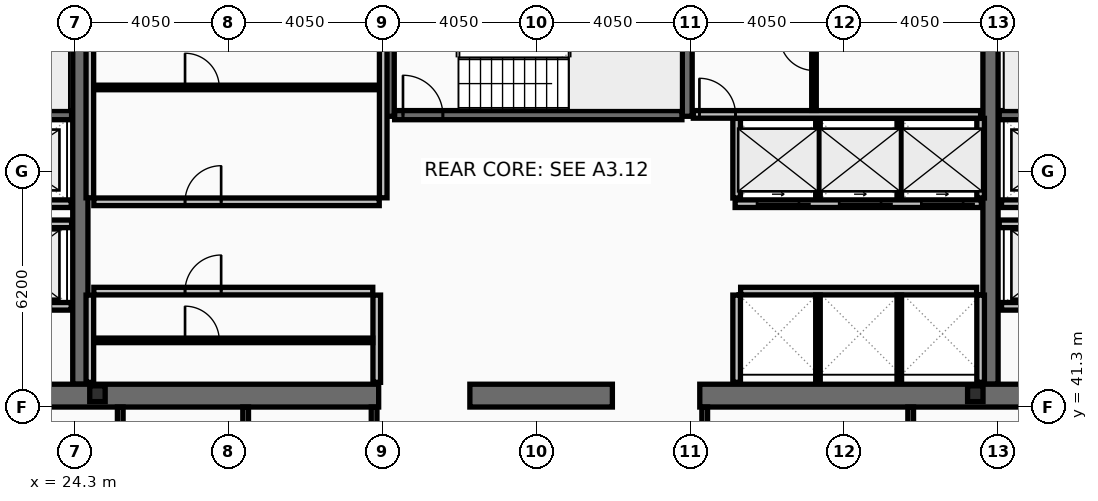
"""IFC4 building model, lengths in metres.
Left out: names, types, materials, properties, quantities, classifications, styles, units other than length and angle.
Written with IfcOpenShell. Run it as: python <this file> out.ifc"""

import sys

from ifc_helpers import new_model, si_unit, direction, frame, frame_2d, origin, origin_2d, place, context, subcontext, project, spatial, rectangle, i_section, extrude, element, fill, save


model = new_model("IFC4")
c1 = context("Model", 3, precision=1e-05, world=origin(), true_north=direction((0.0, 1.0)))
c2 = subcontext(c1, "Body", "Model", "MODEL_VIEW")
j1 = project(units=[si_unit("LENGTHUNIT", "METRE"), si_unit("PLANEANGLEUNIT", "RADIAN")], contexts=[c1])
p1 = place(None, origin())
s1 = spatial("IfcSite", under=j1, at=p1, CompositionType="ELEMENT")
p2 = place(p1, origin())
s2 = spatial("IfcBuilding", under=s1, at=p2, CompositionType="ELEMENT")
p3 = place(p2, frame((0.0, 0.0, 242.6)))
s3 = spatial("IfcBuildingStorey", under=s2, at=p3, CompositionType="ELEMENT", Elevation=242.6)
for number, where, z_axis, x_axis in (
    (1, (24.45, 41.9, 0.0), (0.0, 0.0, 1.0), (0.0, 1.0, 0.0)),
    (2, (48.4, 41.9, 0.0), (0.0, 0.0, 1.0), (0.0, 1.0, 0.0)),
):
    element("IfcWall", number, at=place(p3, frame(where, z_axis=z_axis, x_axis=x_axis)), inside=s3, PredefinedType="SHEAR", context=c2, shape_type="SweptSolid", body=[
        extrude(rectangle(XDim=11.2, YDim=0.4, at=frame_2d((5.6, 0.0))), origin(), (0.0, 0.0, 1.0), 3.44),
    ])
p4 = place(p3, frame((32.3, 41.6, 0.0), z_axis=(0.0, 0.0, 1.0), x_axis=(-1.0, 0.0, 0.0)))
e3 = element("IfcWall", 3, at=p4, inside=s3, PredefinedType="SHEAR", context=c2, shape_type="SweptSolid", body=[
    extrude(rectangle(XDim=11.45, YDim=0.6, at=frame_2d((5.725, 0.0))), origin(), (0.0, 0.0, 1.0), 3.44),
])
p5 = place(p3, frame((38.45, 41.6, 0.0), z_axis=(0.0, 0.0, 1.0), x_axis=(-1.0, 0.0, 0.0)))
e4 = element("IfcWall", 4, at=p5, inside=s3, PredefinedType="SHEAR", context=c2, shape_type="SweptSolid", body=[
    extrude(rectangle(XDim=3.75, YDim=0.6, at=frame_2d((1.875, 0.0))), origin(), (0.0, 0.0, 1.0), 3.44),
])
p6 = place(p3, frame((52.05, 41.6, 0.0), z_axis=(0.0, 0.0, 1.0), x_axis=(-1.0, 0.0, 0.0)))
e5 = element("IfcWall", 5, at=p6, inside=s3, PredefinedType="SHEAR", context=c2, shape_type="SweptSolid", body=[
    extrude(rectangle(XDim=11.3, YDim=0.6, at=frame_2d((5.65, 0.0))), origin(), (0.0, 0.0, 1.0), 3.44),
])
for number, where, z_axis, x_axis in (
    (6, (32.58, 48.95, 0.0), (0.0, 0.0, 1.0), (0.0, 1.0, 0.0)),
    (7, (40.42, 48.95, 0.0), (0.0, 0.0, 1.0), (0.0, 1.0, 0.0)),
):
    element("IfcWall", number, at=place(p3, frame(where, z_axis=z_axis, x_axis=x_axis)), inside=s3, PredefinedType="SHEAR", context=c2, shape_type="SweptSolid", body=[
        extrude(rectangle(XDim=4.15, YDim=0.26, at=frame_2d((2.075, 0.0))), origin(), (0.0, 0.0, 1.0), 3.44),
    ])
p7 = place(p3, frame((16.8, 48.98, 0.0), z_axis=(0.0, 0.0, 1.0), x_axis=(1.0, 0.0, 0.0)))
e8 = element("IfcWall", 8, at=p7, inside=s3, PredefinedType="SHEAR", context=c2, shape_type="SweptSolid", body=[
    extrude(rectangle(XDim=7.42, YDim=0.24, at=frame_2d((3.71, 0.0))), origin(), (0.0, 0.0, 1.0), 3.44),
])
p8 = place(p7, frame((0.22, 0.0, 0.0)))
e9 = element("IfcOpeningElement", 9, at=p8, cuts=e8, PredefinedType="OPENING", context=c2, shape_type="SweptSolid", body=[
    extrude(rectangle(XDim=1.05, YDim=2.15, at=frame_2d((0.525, 1.075))), frame((0.0, 0.13, 0.0), z_axis=(0.0, -1.0, 0.0), x_axis=(1.0, 0.0, 0.0)), (0.0, 0.0, 1.0), 0.26),
])
p9 = place(p3, frame((48.63, 48.98, 0.0), z_axis=(0.0, 0.0, 1.0), x_axis=(1.0, 0.0, 0.0)))
e10 = element("IfcWall", 10, at=p9, inside=s3, PredefinedType="SHEAR", context=c2, shape_type="SweptSolid", body=[
    extrude(rectangle(XDim=7.47, YDim=0.24, at=frame_2d((3.735, 0.0))), origin(), (0.0, 0.0, 1.0), 3.44),
])
p10 = place(p9, frame((6.2, 0.0, 0.0)))
e11 = element("IfcOpeningElement", 11, at=p10, cuts=e10, PredefinedType="OPENING", context=c2, shape_type="SweptSolid", body=[
    extrude(rectangle(XDim=1.05, YDim=2.15, at=frame_2d((0.525, 1.075))), frame((0.0, 0.13, 0.0), z_axis=(0.0, -1.0, 0.0), x_axis=(1.0, 0.0, 0.0)), (0.0, 0.0, 1.0), 0.26),
])
p11 = place(p3, frame((32.72, 48.98, 0.0), z_axis=(0.0, 0.0, 1.0), x_axis=(1.0, 0.0, 0.0)))
e12 = element("IfcWall", 12, at=p11, inside=s3, PredefinedType="SHEAR", context=c2, shape_type="SweptSolid", body=[
    extrude(rectangle(XDim=7.56, YDim=0.24, at=frame_2d((3.78, 0.0))), origin(), (0.0, 0.0, 1.0), 3.44),
])
p12 = place(p11, frame((0.22, 0.0, 0.0)))
e13 = element("IfcOpeningElement", 13, at=p12, cuts=e12, PredefinedType="OPENING", context=c2, shape_type="SweptSolid", body=[
    extrude(rectangle(XDim=1.05, YDim=2.15, at=frame_2d((0.525, 1.075))), frame((0.0, 0.13, 0.0), z_axis=(0.0, -1.0, 0.0), x_axis=(1.0, 0.0, 0.0)), (0.0, 0.0, 1.0), 0.26),
])
for number, where, z_axis, x_axis in (
    (14, (24.9, 41.65, 0.0), (0.0, 0.0, 1.0), (1.0, 0.0, 0.0)),
    (15, (48.0, 41.65, 0.0), (0.0, 0.0, 1.0), (1.0, 0.0, 0.0)),
):
    element("IfcColumn", number, at=place(p3, frame(where, z_axis=z_axis, x_axis=x_axis)), inside=s3, PredefinedType="COLUMN", context=c2, shape_type="SweptSolid", body=[
        extrude(i_section(OverallWidth=0.406, OverallDepth=0.416, WebThickness=0.03, FlangeThickness=0.048, at=origin_2d()), origin(), (0.0, 0.0, 1.0), 3.6),
    ])
p13 = place(p3, frame((51.61, 43.95, 0.0), z_axis=(0.0, 0.0, 1.0), x_axis=(-1.0, 0.0, 0.0)))
e16 = element("IfcWall", 16, at=p13, inside=s3, PredefinedType="PARTITIONING", context=c2, shape_type="SweptSolid", body=[
    extrude(rectangle(XDim=2.92, YDim=0.2, at=frame_2d((1.46, 0.0))), origin(), (0.0, 0.0, 1.0), 3.44),
])
p14 = place(p13, frame((0.81, 0.0, 0.0)))
e17 = element("IfcOpeningElement", 17, at=p14, cuts=e16, PredefinedType="OPENING", context=c2, shape_type="SweptSolid", body=[
    extrude(rectangle(XDim=1.3, YDim=2.18, at=frame_2d((0.65, 1.09))), frame((0.0, 0.11, 0.0), z_axis=(0.0, -1.0, 0.0), x_axis=(1.0, 0.0, 0.0)), (0.0, 0.0, 1.0), 0.22),
])
p15 = place(p3, frame((24.21, 43.95, 0.0), z_axis=(0.0, 0.0, 1.0), x_axis=(-1.0, 0.0, 0.0)))
e18 = element("IfcWall", 18, at=p15, inside=s3, PredefinedType="PARTITIONING", context=c2, shape_type="SweptSolid", body=[
    extrude(rectangle(XDim=2.97, YDim=0.2, at=frame_2d((1.485, 0.0))), origin(), (0.0, 0.0, 1.0), 3.44),
])
p16 = place(p15, frame((0.86, 0.0, 0.0)))
e19 = element("IfcOpeningElement", 19, at=p16, cuts=e18, PredefinedType="OPENING", context=c2, shape_type="SweptSolid", body=[
    extrude(rectangle(XDim=1.3, YDim=2.18, at=frame_2d((0.65, 1.09))), frame((0.0, 0.11, 0.0), z_axis=(0.0, -1.0, 0.0), x_axis=(1.0, 0.0, 0.0)), (0.0, 0.0, 1.0), 0.22),
])
p17 = place(p3, frame((51.61, 46.65, 0.0), z_axis=(0.0, 0.0, 1.0), x_axis=(-1.0, 0.0, 0.0)))
e20 = element("IfcWall", 20, at=p17, inside=s3, PredefinedType="PARTITIONING", context=c2, shape_type="SweptSolid", body=[
    extrude(rectangle(XDim=2.92, YDim=0.2, at=frame_2d((1.46, 0.0))), origin(), (0.0, 0.0, 1.0), 3.44),
])
p18 = place(p17, frame((0.86, 0.0, 0.0)))
e21 = element("IfcOpeningElement", 21, at=p18, cuts=e20, PredefinedType="OPENING", context=c2, shape_type="SweptSolid", body=[
    extrude(rectangle(XDim=1.2, YDim=2.18, at=frame_2d((0.6, 1.09))), frame((0.0, 0.11, 0.0), z_axis=(0.0, -1.0, 0.0), x_axis=(1.0, 0.0, 0.0)), (0.0, 0.0, 1.0), 0.22),
])
p19 = place(p3, frame((24.21, 46.65, 0.0), z_axis=(0.0, 0.0, 1.0), x_axis=(-1.0, 0.0, 0.0)))
e22 = element("IfcWall", 22, at=p19, inside=s3, PredefinedType="PARTITIONING", context=c2, shape_type="SweptSolid", body=[
    extrude(rectangle(XDim=2.97, YDim=0.2, at=frame_2d((1.485, 0.0))), origin(), (0.0, 0.0, 1.0), 3.44),
])
p20 = place(p19, frame((0.91, 0.0, 0.0)))
e23 = element("IfcOpeningElement", 23, at=p20, cuts=e22, PredefinedType="OPENING", context=c2, shape_type="SweptSolid", body=[
    extrude(rectangle(XDim=1.2, YDim=2.18, at=frame_2d((0.6, 1.09))), frame((0.0, 0.11, 0.0), z_axis=(0.0, -1.0, 0.0), x_axis=(1.0, 0.0, 0.0)), (0.0, 0.0, 1.0), 0.22),
])
p21 = place(p3, frame((48.16, 46.65, 0.0), z_axis=(0.0, 0.0, 1.0), x_axis=(-1.0, 0.0, 0.0)))
e24 = element("IfcWall", 24, at=p21, inside=s3, PredefinedType="PARTITIONING", context=c2, shape_type="SweptSolid", body=[
    extrude(rectangle(XDim=6.48, YDim=0.2, at=frame_2d((3.24, 0.0))), origin(), (0.0, 0.0, 1.0), 3.44),
])
p22 = place(p21, frame((4.8, 0.0, 0.0)))
e25 = element("IfcOpeningElement", 25, at=p22, cuts=e24, PredefinedType="OPENING", context=c2, shape_type="SweptSolid", body=[
    extrude(rectangle(XDim=1.1, YDim=2.18, at=frame_2d((0.55, 1.09))), frame((0.0, 0.11, 0.0), z_axis=(0.0, -1.0, 0.0), x_axis=(1.0, 0.0, 0.0)), (0.0, 0.0, 1.0), 0.22),
])
p23 = place(p21, frame((2.64, 0.0, 0.0)))
e26 = element("IfcOpeningElement", 26, at=p23, cuts=e24, PredefinedType="OPENING", context=c2, shape_type="SweptSolid", body=[
    extrude(rectangle(XDim=1.1, YDim=2.18, at=frame_2d((0.55, 1.09))), frame((0.0, 0.11, 0.0), z_axis=(0.0, -1.0, 0.0), x_axis=(1.0, 0.0, 0.0)), (0.0, 0.0, 1.0), 0.22),
])
p24 = place(p21, frame((0.48, 0.0, 0.0)))
e27 = element("IfcOpeningElement", 27, at=p24, cuts=e24, PredefinedType="OPENING", context=c2, shape_type="SweptSolid", body=[
    extrude(rectangle(XDim=1.1, YDim=2.18, at=frame_2d((0.55, 1.09))), frame((0.0, 0.11, 0.0), z_axis=(0.0, -1.0, 0.0), x_axis=(1.0, 0.0, 0.0)), (0.0, 0.0, 1.0), 0.22),
])
p25 = place(p3, frame((21.2, 46.12, 0.0), z_axis=(0.0, 0.0, 1.0), x_axis=(1.0, 0.0, 0.0)))
e28 = element("IfcWall", 28, at=p25, inside=s3, PredefinedType="PARTITIONING", context=c2, shape_type="SweptSolid", body=[
    extrude(rectangle(XDim=3.02, YDim=0.2, at=frame_2d((1.51, 0.0))), origin(), (0.0, 0.0, 1.0), 3.44),
])
p26 = place(p3, frame((48.63, 46.12, 0.0), z_axis=(0.0, 0.0, 1.0), x_axis=(1.0, 0.0, 0.0)))
e29 = element("IfcWall", 29, at=p26, inside=s3, PredefinedType="PARTITIONING", context=c2, shape_type="SweptSolid", body=[
    extrude(rectangle(XDim=3.07, YDim=0.2, at=frame_2d((1.535, 0.0))), origin(), (0.0, 0.0, 1.0), 3.44),
])
for number, where, z_axis, x_axis in (
    (30, (24.7, 46.805, 0.0), (0.0, 0.0, 1.0), (0.0, 1.0, 0.0)),
    (31, (32.42, 46.805, 0.0), (0.0, 0.0, 1.0), (0.0, 1.0, 0.0)),
):
    element("IfcWall", number, at=place(p3, frame(where, z_axis=z_axis, x_axis=x_axis)), inside=s3, PredefinedType="PARTITIONING", context=c2, shape_type="SweptSolid", body=[
        extrude(rectangle(XDim=5.99, YDim=0.2, at=frame_2d((2.995, 0.0))), origin(), (0.0, 0.0, 1.0), 3.44),
    ])
p27 = place(p3, frame((24.805, 49.709, 0.0), z_axis=(0.0, 0.0, 1.0), x_axis=(1.0, 0.0, 0.0)))
e32 = element("IfcWall", 32, at=p27, inside=s3, PredefinedType="PARTITIONING", context=c2, shape_type="SweptSolid", body=[
    extrude(rectangle(XDim=7.51, YDim=0.12, at=frame_2d((3.755, 0.0))), origin(), (0.0, 0.0, 1.0), 3.44),
])
p28 = place(p27, frame((2.4, 0.0, 0.0)))
e33 = element("IfcOpeningElement", 33, at=p28, cuts=e32, PredefinedType="OPENING", context=c2, shape_type="SweptSolid", body=[
    extrude(rectangle(XDim=0.9, YDim=2.05, at=frame_2d((0.45, 1.025))), frame((0.0, 0.07, 0.0), z_axis=(0.0, -1.0, 0.0), x_axis=(1.0, 0.0, 0.0)), (0.0, 0.0, 1.0), 0.14),
])
p29 = place(p3, frame((24.805, 46.7, 0.0), z_axis=(0.0, 0.0, 1.0), x_axis=(1.0, 0.0, 0.0)))
e34 = element("IfcWall", 34, at=p29, inside=s3, PredefinedType="PARTITIONING", context=c2, shape_type="SweptSolid", body=[
    extrude(rectangle(XDim=7.51, YDim=0.2, at=frame_2d((3.755, 0.0))), origin(), (0.0, 0.0, 1.0), 3.44),
])
p30 = place(p29, frame((2.4, 0.0, 0.0)))
e35 = element("IfcOpeningElement", 35, at=p30, cuts=e34, PredefinedType="OPENING", context=c2, shape_type="SweptSolid", body=[
    extrude(rectangle(XDim=0.95, YDim=2.1, at=frame_2d((0.475, 1.05))), frame((0.0, 0.11, 0.0), z_axis=(0.0, -1.0, 0.0), x_axis=(1.0, 0.0, 0.0)), (0.0, 0.0, 1.0), 0.22),
])
for number, where, z_axis, x_axis in (
    (36, (24.7, 41.95, 0.0), (0.0, 0.0, 1.0), (0.0, 1.0, 0.0)),
    (37, (32.25, 41.95, 0.0), (0.0, 0.0, 1.0), (0.0, 1.0, 0.0)),
):
    element("IfcWall", number, at=place(p3, frame(where, z_axis=z_axis, x_axis=x_axis)), inside=s3, PredefinedType="PARTITIONING", context=c2, shape_type="SweptSolid", body=[
        extrude(rectangle(XDim=2.295, YDim=0.2, at=frame_2d((1.147, 0.0))), origin(), (0.0, 0.0, 1.0), 3.44),
    ])
p31 = place(p3, frame((24.805, 43.054, 0.0), z_axis=(0.0, 0.0, 1.0), x_axis=(1.0, 0.0, 0.0)))
e38 = element("IfcWall", 38, at=p31, inside=s3, PredefinedType="PARTITIONING", context=c2, shape_type="SweptSolid", body=[
    extrude(rectangle(XDim=7.34, YDim=0.12, at=frame_2d((3.67, 0.0))), origin(), (0.0, 0.0, 1.0), 3.44),
])
p32 = place(p31, frame((2.4, 0.0, 0.0)))
e39 = element("IfcOpeningElement", 39, at=p32, cuts=e38, PredefinedType="OPENING", context=c2, shape_type="SweptSolid", body=[
    extrude(rectangle(XDim=0.9, YDim=2.05, at=frame_2d((0.45, 1.025))), frame((0.0, 0.07, 0.0), z_axis=(0.0, -1.0, 0.0), x_axis=(1.0, 0.0, 0.0)), (0.0, 0.0, 1.0), 0.14),
])
p33 = place(p3, frame((24.805, 44.35, 0.0), z_axis=(0.0, 0.0, 1.0), x_axis=(1.0, 0.0, 0.0)))
e40 = element("IfcWall", 40, at=p33, inside=s3, PredefinedType="PARTITIONING", context=c2, shape_type="SweptSolid", body=[
    extrude(rectangle(XDim=7.34, YDim=0.2, at=frame_2d((3.67, 0.0))), origin(), (0.0, 0.0, 1.0), 3.44),
])
p34 = place(p33, frame((2.4, 0.0, 0.0)))
e41 = element("IfcOpeningElement", 41, at=p34, cuts=e40, PredefinedType="OPENING", context=c2, shape_type="SweptSolid", body=[
    extrude(rectangle(XDim=0.95, YDim=2.1, at=frame_2d((0.475, 1.05))), frame((0.0, 0.11, 0.0), z_axis=(0.0, -1.0, 0.0), x_axis=(1.0, 0.0, 0.0)), (0.0, 0.0, 1.0), 0.22),
])
for number, where, z_axis, x_axis in (
    (42, (41.72, 46.8, 0.0), (0.0, 0.0, 1.0), (0.0, 1.0, 0.0)),
    (43, (48.14, 46.8, 0.0), (0.0, 0.0, 1.0), (0.0, 1.0, 0.0)),
):
    element("IfcWall", number, at=place(p3, frame(where, z_axis=z_axis, x_axis=x_axis)), inside=s3, PredefinedType="PARTITIONING", context=c2, shape_type="SweptSolid", body=[
        extrude(rectangle(XDim=2.095, YDim=0.2, at=frame_2d((1.047, 0.0))), origin(), (0.0, 0.0, 1.0), 3.44),
    ])
for number, where, z_axis, x_axis in (
    (44, (43.86, 46.8, 0.0), (0.0, 0.0, 1.0), (0.0, 1.0, 0.0)),
    (45, (46.0, 46.8, 0.0), (0.0, 0.0, 1.0), (0.0, 1.0, 0.0)),
):
    element("IfcWall", number, at=place(p3, frame(where, z_axis=z_axis, x_axis=x_axis)), inside=s3, PredefinedType="PARTITIONING", context=c2, shape_type="SweptSolid", body=[
        extrude(rectangle(XDim=2.095, YDim=0.12, at=frame_2d((1.047, 0.0))), origin(), (0.0, 0.0, 1.0), 3.44),
    ])
p35 = place(p3, frame((41.825, 44.35, 0.0), z_axis=(0.0, 0.0, 1.0), x_axis=(1.0, 0.0, 0.0)))
e46 = element("IfcWall", 46, at=p35, inside=s3, PredefinedType="PARTITIONING", context=c2, shape_type="SweptSolid", body=[
    extrude(rectangle(XDim=6.21, YDim=0.2, at=frame_2d((3.105, 0.0))), origin(), (0.0, 0.0, 1.0), 3.44),
])
for number, where, z_axis, x_axis in (
    (47, (41.72, 41.95, 0.0), (0.0, 0.0, 1.0), (0.0, 1.0, 0.0)),
    (48, (48.14, 41.95, 0.0), (0.0, 0.0, 1.0), (0.0, 1.0, 0.0)),
):
    element("IfcWall", number, at=place(p3, frame(where, z_axis=z_axis, x_axis=x_axis)), inside=s3, PredefinedType="PARTITIONING", context=c2, shape_type="SweptSolid", body=[
        extrude(rectangle(XDim=2.295, YDim=0.2, at=frame_2d((1.147, 0.0))), origin(), (0.0, 0.0, 1.0), 3.44),
    ])
for number, where, z_axis, x_axis in (
    (49, (43.86, 41.95, 0.0), (0.0, 0.0, 1.0), (0.0, 1.0, 0.0)),
    (50, (46.0, 41.95, 0.0), (0.0, 0.0, 1.0), (0.0, 1.0, 0.0)),
):
    element("IfcWall", number, at=place(p3, frame(where, z_axis=z_axis, x_axis=x_axis)), inside=s3, PredefinedType="PARTITIONING", context=c2, shape_type="SweptSolid", body=[
        extrude(rectangle(XDim=2.295, YDim=0.12, at=frame_2d((1.147, 0.0))), origin(), (0.0, 0.0, 1.0), 3.44),
    ])
p36 = place(p3, frame((40.58, 49.0, 0.0), z_axis=(0.0, 0.0, 1.0), x_axis=(1.0, 0.0, 0.0)))
e51 = element("IfcWall", 51, at=p36, inside=s3, PredefinedType="PARTITIONING", context=c2, shape_type="SweptSolid", body=[
    extrude(rectangle(XDim=7.56, YDim=0.2, at=frame_2d((3.78, 0.0))), origin(), (0.0, 0.0, 1.0), 3.44),
])
p37 = place(p36, frame((0.16, 0.0, 0.0)))
e52 = element("IfcOpeningElement", 52, at=p37, cuts=e51, PredefinedType="OPENING", context=c2, shape_type="SweptSolid", body=[
    extrude(rectangle(XDim=0.95, YDim=2.1, at=frame_2d((0.475, 1.05))), frame((0.0, 0.11, 0.0), z_axis=(0.0, -1.0, 0.0), x_axis=(1.0, 0.0, 0.0)), (0.0, 0.0, 1.0), 0.22),
])
p38 = place(p3, frame((43.755, 49.105, 0.0), z_axis=(0.0, 0.0, 1.0), x_axis=(0.0, 1.0, 0.0)))
e53 = element("IfcWall", 53, at=p38, inside=s3, PredefinedType="PARTITIONING", context=c2, shape_type="SweptSolid", body=[
    extrude(rectangle(XDim=3.69, YDim=0.12, at=frame_2d((1.845, 0.0))), origin(), (0.0, 0.0, 1.0), 3.44),
])
p39 = place(p38, frame((1.05, 0.0, 0.0)))
e54 = element("IfcOpeningElement", 54, at=p39, cuts=e53, PredefinedType="OPENING", context=c2, shape_type="SweptSolid", body=[
    extrude(rectangle(XDim=0.9, YDim=2.05, at=frame_2d((0.45, 1.025))), frame((0.0, 0.07, 0.0), z_axis=(0.0, -1.0, 0.0), x_axis=(1.0, 0.0, 0.0)), (0.0, 0.0, 1.0), 0.14),
])
for number, where, z_axis, x_axis in (
    (55, (25.5, 38.28, 0.0), (0.0, 0.0, 1.0), (0.0, 1.0, 0.0)),
    (56, (28.8, 38.28, 0.0), (0.0, 0.0, 1.0), (0.0, 1.0, 0.0)),
    (57, (32.18, 38.28, 0.0), (0.0, 0.0, 1.0), (0.0, 1.0, 0.0)),
    (58, (40.88, 38.28, 0.0), (0.0, 0.0, 1.0), (0.0, 1.0, 0.0)),
    (59, (46.3, 38.28, 0.0), (0.0, 0.0, 1.0), (0.0, 1.0, 0.0)),
):
    element("IfcWall", number, at=place(p3, frame(where, z_axis=z_axis, x_axis=x_axis)), inside=s3, PredefinedType="PARTITIONING", context=c2, shape_type="SweptSolid", body=[
        extrude(rectangle(XDim=3.02, YDim=0.15, at=frame_2d((1.51, 0.0))), origin(), (0.0, 0.0, 1.0), 3.44),
    ])
p40 = place(p12, origin())
e60 = element("IfcDoor", 60, at=p40, inside=s3, OperationType="SINGLE_SWING_LEFT", PredefinedType="DOOR", context=c2, shape_type="SweptSolid", body=[
    extrude(rectangle(XDim=1.05, YDim=2.15, at=frame_2d((0.525, 1.075))), frame((0.0, 0.025, 0.0), z_axis=(0.0, -1.0, 0.0), x_axis=(1.0, 0.0, 0.0)), (0.0, 0.0, 1.0), 0.05),
])
fill(e13, e60)
p41 = place(p22, origin())
e61 = element("IfcDoor", 61, at=p41, inside=s3, OperationType="SLIDING_TO_LEFT", PredefinedType="DOOR", context=c2, shape_type="SweptSolid", body=[
    extrude(rectangle(XDim=1.1, YDim=2.18, at=frame_2d((0.55, 1.09))), frame((0.0, 0.025, 0.0), z_axis=(0.0, -1.0, 0.0), x_axis=(1.0, 0.0, 0.0)), (0.0, 0.0, 1.0), 0.05),
])
fill(e25, e61)
p42 = place(p23, origin())
e62 = element("IfcDoor", 62, at=p42, inside=s3, OperationType="SLIDING_TO_LEFT", PredefinedType="DOOR", context=c2, shape_type="SweptSolid", body=[
    extrude(rectangle(XDim=1.1, YDim=2.18, at=frame_2d((0.55, 1.09))), frame((0.0, 0.025, 0.0), z_axis=(0.0, -1.0, 0.0), x_axis=(1.0, 0.0, 0.0)), (0.0, 0.0, 1.0), 0.05),
])
fill(e26, e62)
p43 = place(p24, origin())
e63 = element("IfcDoor", 63, at=p43, inside=s3, OperationType="SLIDING_TO_LEFT", PredefinedType="DOOR", context=c2, shape_type="SweptSolid", body=[
    extrude(rectangle(XDim=1.1, YDim=2.18, at=frame_2d((0.55, 1.09))), frame((0.0, 0.025, 0.0), z_axis=(0.0, -1.0, 0.0), x_axis=(1.0, 0.0, 0.0)), (0.0, 0.0, 1.0), 0.05),
])
fill(e27, e63)
p44 = place(p28, origin())
e64 = element("IfcDoor", 64, at=p44, inside=s3, OperationType="SINGLE_SWING_LEFT", PredefinedType="DOOR", context=c2, shape_type="SweptSolid", body=[
    extrude(rectangle(XDim=0.9, YDim=2.05, at=frame_2d((0.45, 1.025))), frame((0.0, 0.025, 0.0), z_axis=(0.0, -1.0, 0.0), x_axis=(1.0, 0.0, 0.0)), (0.0, 0.0, 1.0), 0.05),
])
fill(e33, e64)
p45 = place(p30, origin())
e65 = element("IfcDoor", 65, at=p45, inside=s3, OperationType="SINGLE_SWING_RIGHT", PredefinedType="DOOR", context=c2, shape_type="SweptSolid", body=[
    extrude(rectangle(XDim=0.95, YDim=2.1, at=frame_2d((0.475, 1.05))), frame((0.0, 0.025, 0.0), z_axis=(0.0, -1.0, 0.0), x_axis=(1.0, 0.0, 0.0)), (0.0, 0.0, 1.0), 0.05),
])
fill(e35, e65)
p46 = place(p32, origin())
e66 = element("IfcDoor", 66, at=p46, inside=s3, OperationType="SINGLE_SWING_LEFT", PredefinedType="DOOR", context=c2, shape_type="SweptSolid", body=[
    extrude(rectangle(XDim=0.9, YDim=2.05, at=frame_2d((0.45, 1.025))), frame((0.0, 0.025, 0.0), z_axis=(0.0, -1.0, 0.0), x_axis=(1.0, 0.0, 0.0)), (0.0, 0.0, 1.0), 0.05),
])
fill(e39, e66)
p47 = place(p34, origin())
e67 = element("IfcDoor", 67, at=p47, inside=s3, OperationType="SINGLE_SWING_RIGHT", PredefinedType="DOOR", context=c2, shape_type="SweptSolid", body=[
    extrude(rectangle(XDim=0.95, YDim=2.1, at=frame_2d((0.475, 1.05))), frame((0.0, 0.025, 0.0), z_axis=(0.0, -1.0, 0.0), x_axis=(1.0, 0.0, 0.0)), (0.0, 0.0, 1.0), 0.05),
])
fill(e41, e67)
p48 = place(p37, origin())
e68 = element("IfcDoor", 68, at=p48, inside=s3, OperationType="SINGLE_SWING_LEFT", PredefinedType="DOOR", context=c2, shape_type="SweptSolid", body=[
    extrude(rectangle(XDim=0.95, YDim=2.1, at=frame_2d((0.475, 1.05))), frame((0.0, 0.025, 0.0), z_axis=(0.0, -1.0, 0.0), x_axis=(1.0, 0.0, 0.0)), (0.0, 0.0, 1.0), 0.05),
])
fill(e52, e68)
p49 = place(p39, origin())
e69 = element("IfcDoor", 69, at=p49, inside=s3, OperationType="SINGLE_SWING_RIGHT", PredefinedType="DOOR", context=c2, shape_type="SweptSolid", body=[
    extrude(rectangle(XDim=0.9, YDim=2.05, at=frame_2d((0.45, 1.025))), frame((0.0, 0.025, 0.0), z_axis=(0.0, -1.0, 0.0), x_axis=(1.0, 0.0, 0.0)), (0.0, 0.0, 1.0), 0.05),
])
fill(e54, e69)
save(model, sys.argv[1])
